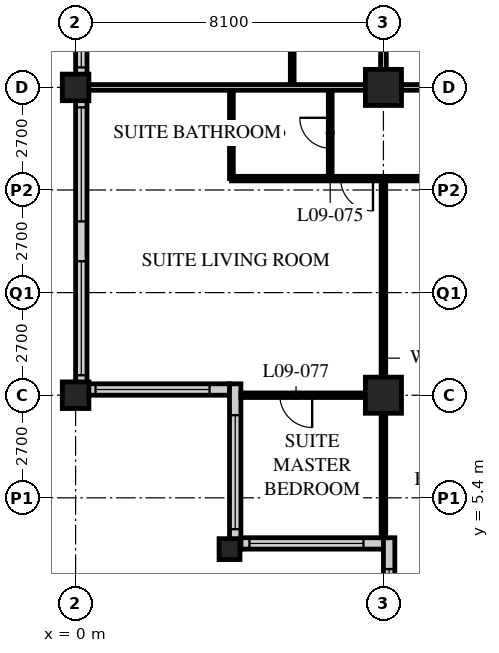
"""IFC4 building model, lengths in metres.
Left out: names, types, materials, properties, quantities, classifications, styles, units other than length and angle.
Written with IfcOpenShell. Run it as: python <this file> out.ifc"""

import sys

from ifc_helpers import new_model, si_unit, direction, frame, frame_2d, origin, origin_2d, place, context, subcontext, project, spatial, rectangle, hollow_rectangle, extrude, element, fill, save


model = new_model("IFC4")
c1 = context("Model", 3, precision=1e-05, world=origin(), true_north=direction((0.0, 1.0)))
c2 = subcontext(c1, "Body", "Model", "MODEL_VIEW")
j1 = project(units=[si_unit("LENGTHUNIT", "METRE"), si_unit("PLANEANGLEUNIT", "RADIAN")], contexts=[c1])
p1 = place(None, origin())
s1 = spatial("IfcSite", under=j1, at=p1, CompositionType="ELEMENT")
p2 = place(p1, origin())
s2 = spatial("IfcBuilding", under=s1, at=p2, CompositionType="ELEMENT")
p3 = place(p2, frame((0.0, 0.0, 43.2)))
s3 = spatial("IfcBuildingStorey", under=s2, at=p3, CompositionType="ELEMENT", Elevation=43.2)
for number, where, z_axis, x_axis in (
    (1, (0.0, 8.1, 0.0), (0.0, 0.0, 1.0), (1.0, 0.0, 0.0)),
    (2, (0.0, 16.2, 0.0), (0.0, 0.0, 1.0), (1.0, 0.0, 0.0)),
):
    element("IfcColumn", number, at=place(p3, frame(where, z_axis=z_axis, x_axis=x_axis)), inside=s3, PredefinedType="COLUMN", context=c2, shape_type="SweptSolid", body=[
        extrude(hollow_rectangle(XDim=0.7, YDim=0.7, WallThickness=0.06, at=origin_2d()), origin(), (0.0, 0.0, 1.0), 3.4),
    ])
p4 = place(p3, frame((4.05, 4.05, 0.0), z_axis=(0.0, 0.0, 1.0), x_axis=(1.0, 0.0, 0.0)))
e3 = element("IfcColumn", 3, at=p4, inside=s3, PredefinedType="COLUMN", context=c2, shape_type="SweptSolid", body=[
    extrude(hollow_rectangle(XDim=0.55, YDim=0.55, WallThickness=0.05, at=origin_2d()), origin(), (0.0, 0.0, 1.0), 3.4),
])
for number, where, z_axis, x_axis in (
    (4, (8.1, 8.1, 0.0), (0.0, 0.0, 1.0), (1.0, 0.0, 0.0)),
    (5, (8.1, 16.2, 0.0), (0.0, 0.0, 1.0), (1.0, 0.0, 0.0)),
):
    element("IfcColumn", number, at=place(p3, frame(where, z_axis=z_axis, x_axis=x_axis)), inside=s3, PredefinedType="COLUMN", context=c2, shape_type="SweptSolid", body=[
        extrude(hollow_rectangle(XDim=0.95, YDim=0.95, WallThickness=0.095, at=origin_2d()), origin(), (0.0, 0.0, 1.0), 3.4),
    ])
p5 = place(p3, frame((0.15, 40.2, 0.0), z_axis=(0.0, 0.0, 1.0), x_axis=(0.0, -1.0, 0.0)))
e6 = element("IfcWall", 6, at=p5, inside=s3, PredefinedType="SOLIDWALL", context=c2, shape_type="SweptSolid", body=[
    extrude(rectangle(XDim=32.1, YDim=0.3, at=frame_2d((16.05, 0.0))), origin(), (0.0, 0.0, 1.0), 3.19),
])
p6 = place(p5, frame((0.225, 0.0, 0.9)))
e7 = element("IfcOpeningElement", 7, at=p6, cuts=e6, PredefinedType="OPENING", context=c2, shape_type="SweptSolid", body=[
    extrude(rectangle(XDim=3.0, YDim=2.0, at=frame_2d((1.5, 1.0))), frame((0.0, 0.16, 0.0), z_axis=(0.0, -1.0, 0.0), x_axis=(1.0, 0.0, 0.0)), (0.0, 0.0, 1.0), 0.32),
])
p7 = place(p5, frame((4.275, 0.0, 0.9)))
e8 = element("IfcOpeningElement", 8, at=p7, cuts=e6, PredefinedType="OPENING", context=c2, shape_type="SweptSolid", body=[
    extrude(rectangle(XDim=3.0, YDim=2.0, at=frame_2d((1.5, 1.0))), frame((0.0, 0.16, 0.0), z_axis=(0.0, -1.0, 0.0), x_axis=(1.0, 0.0, 0.0)), (0.0, 0.0, 1.0), 0.32),
])
p8 = place(p5, frame((8.325, 0.0, 0.9)))
e9 = element("IfcOpeningElement", 9, at=p8, cuts=e6, PredefinedType="OPENING", context=c2, shape_type="SweptSolid", body=[
    extrude(rectangle(XDim=3.0, YDim=2.0, at=frame_2d((1.5, 1.0))), frame((0.0, 0.16, 0.0), z_axis=(0.0, -1.0, 0.0), x_axis=(1.0, 0.0, 0.0)), (0.0, 0.0, 1.0), 0.32),
])
p9 = place(p5, frame((12.375, 0.0, 0.9)))
e10 = element("IfcOpeningElement", 10, at=p9, cuts=e6, PredefinedType="OPENING", context=c2, shape_type="SweptSolid", body=[
    extrude(rectangle(XDim=3.0, YDim=2.0, at=frame_2d((1.5, 1.0))), frame((0.0, 0.16, 0.0), z_axis=(0.0, -1.0, 0.0), x_axis=(1.0, 0.0, 0.0)), (0.0, 0.0, 1.0), 0.32),
])
p10 = place(p5, frame((16.425, 0.0, 0.9)))
e11 = element("IfcOpeningElement", 11, at=p10, cuts=e6, PredefinedType="OPENING", context=c2, shape_type="SweptSolid", body=[
    extrude(rectangle(XDim=3.0, YDim=2.0, at=frame_2d((1.5, 1.0))), frame((0.0, 0.16, 0.0), z_axis=(0.0, -1.0, 0.0), x_axis=(1.0, 0.0, 0.0)), (0.0, 0.0, 1.0), 0.32),
])
p11 = place(p5, frame((20.475, 0.0, 0.9)))
e12 = element("IfcOpeningElement", 12, at=p11, cuts=e6, PredefinedType="OPENING", context=c2, shape_type="SweptSolid", body=[
    extrude(rectangle(XDim=3.0, YDim=2.0, at=frame_2d((1.5, 1.0))), frame((0.0, 0.16, 0.0), z_axis=(0.0, -1.0, 0.0), x_axis=(1.0, 0.0, 0.0)), (0.0, 0.0, 1.0), 0.32),
])
p12 = place(p5, frame((24.525, 0.0, 0.9)))
e13 = element("IfcOpeningElement", 13, at=p12, cuts=e6, PredefinedType="OPENING", context=c2, shape_type="SweptSolid", body=[
    extrude(rectangle(XDim=3.0, YDim=2.0, at=frame_2d((1.5, 1.0))), frame((0.0, 0.16, 0.0), z_axis=(0.0, -1.0, 0.0), x_axis=(1.0, 0.0, 0.0)), (0.0, 0.0, 1.0), 0.32),
])
p13 = place(p5, frame((28.575, 0.0, 0.9)))
e14 = element("IfcOpeningElement", 14, at=p13, cuts=e6, PredefinedType="OPENING", context=c2, shape_type="SweptSolid", body=[
    extrude(rectangle(XDim=3.0, YDim=2.0, at=frame_2d((1.5, 1.0))), frame((0.0, 0.16, 0.0), z_axis=(0.0, -1.0, 0.0), x_axis=(1.0, 0.0, 0.0)), (0.0, 0.0, 1.0), 0.32),
])
p14 = place(p3, frame((0.3, 8.25, 0.0), z_axis=(0.0, 0.0, 1.0), x_axis=(1.0, 0.0, 0.0)))
e15 = element("IfcWall", 15, at=p14, inside=s3, PredefinedType="SOLIDWALL", context=c2, shape_type="SweptSolid", body=[
    extrude(rectangle(XDim=3.75, YDim=0.3, at=frame_2d((1.875, 0.0))), origin(), (0.0, 0.0, 1.0), 3.19),
])
p15 = place(p14, frame((0.225, 0.0, 0.9)))
e16 = element("IfcOpeningElement", 16, at=p15, cuts=e15, PredefinedType="OPENING", context=c2, shape_type="SweptSolid", body=[
    extrude(rectangle(XDim=3.0, YDim=1.5, at=frame_2d((1.5, 0.75))), frame((0.0, 0.16, 0.0), z_axis=(0.0, -1.0, 0.0), x_axis=(1.0, 0.0, 0.0)), (0.0, 0.0, 1.0), 0.32),
])
p16 = place(p3, frame((4.2, 8.4, 0.0), z_axis=(0.0, 0.0, 1.0), x_axis=(0.0, -1.0, 0.0)))
e17 = element("IfcWall", 17, at=p16, inside=s3, PredefinedType="SOLIDWALL", context=c2, shape_type="SweptSolid", body=[
    extrude(rectangle(XDim=4.35, YDim=0.3, at=frame_2d((2.175, 0.0))), origin(), (0.0, 0.0, 1.0), 3.19),
])
p17 = place(p16, frame((0.825, 0.0, 0.9)))
e18 = element("IfcOpeningElement", 18, at=p17, cuts=e17, PredefinedType="OPENING", context=c2, shape_type="SweptSolid", body=[
    extrude(rectangle(XDim=3.0, YDim=1.5, at=frame_2d((1.5, 0.75))), frame((0.0, 0.16, 0.0), z_axis=(0.0, -1.0, 0.0), x_axis=(1.0, 0.0, 0.0)), (0.0, 0.0, 1.0), 0.32),
])
p18 = place(p3, frame((4.35, 4.2, 0.0), z_axis=(0.0, 0.0, 1.0), x_axis=(1.0, 0.0, 0.0)))
e19 = element("IfcWall", 19, at=p18, inside=s3, PredefinedType="SOLIDWALL", context=c2, shape_type="SweptSolid", body=[
    extrude(rectangle(XDim=3.75, YDim=0.3, at=frame_2d((1.875, 0.0))), origin(), (0.0, 0.0, 1.0), 3.19),
])
p19 = place(p18, frame((0.225, 0.0, 0.9)))
e20 = element("IfcOpeningElement", 20, at=p19, cuts=e19, PredefinedType="OPENING", context=c2, shape_type="SweptSolid", body=[
    extrude(rectangle(XDim=3.0, YDim=1.5, at=frame_2d((1.5, 0.75))), frame((0.0, 0.16, 0.0), z_axis=(0.0, -1.0, 0.0), x_axis=(1.0, 0.0, 0.0)), (0.0, 0.0, 1.0), 0.32),
])
p20 = place(p3, frame((8.25, 4.35, 0.0), z_axis=(0.0, 0.0, 1.0), x_axis=(0.0, -1.0, 0.0)))
e21 = element("IfcWall", 21, at=p20, inside=s3, PredefinedType="SOLIDWALL", context=c2, shape_type="SweptSolid", body=[
    extrude(rectangle(XDim=4.35, YDim=0.3, at=frame_2d((2.175, 0.0))), origin(), (0.0, 0.0, 1.0), 3.19),
])
p21 = place(p20, frame((0.825, 0.0, 0.9)))
e22 = element("IfcOpeningElement", 22, at=p21, cuts=e21, PredefinedType="OPENING", context=c2, shape_type="SweptSolid", body=[
    extrude(rectangle(XDim=3.0, YDim=1.5, at=frame_2d((1.5, 0.75))), frame((0.0, 0.16, 0.0), z_axis=(0.0, -1.0, 0.0), x_axis=(1.0, 0.0, 0.0)), (0.0, 0.0, 1.0), 0.32),
])
p22 = place(p3, frame((8.1, 16.2, 0.0), z_axis=(0.0, 0.0, 1.0), x_axis=(1.0, 0.0, 0.0)))
e23 = element("IfcWall", 23, at=p22, inside=s3, PredefinedType="PARTITIONING", context=c2, shape_type="SweptSolid", body=[
    extrude(rectangle(XDim=40.5, YDim=0.15, at=frame_2d((20.25, 0.0))), origin(), (0.0, 0.0, 1.0), 2.578),
])
p23 = place(p22, frame((4.35, 0.0, 0.0)))
e24 = element("IfcOpeningElement", 24, at=p23, cuts=e23, PredefinedType="OPENING", context=c2, shape_type="SweptSolid", body=[
    extrude(rectangle(XDim=1.0, YDim=2.1, at=frame_2d((0.5, 1.05))), frame((0.0, 0.085, 0.0), z_axis=(0.0, -1.0, 0.0), x_axis=(1.0, 0.0, 0.0)), (0.0, 0.0, 1.0), 0.17),
])
p24 = place(p22, frame((10.85, 0.0, 0.0)))
e25 = element("IfcOpeningElement", 25, at=p24, cuts=e23, PredefinedType="OPENING", context=c2, shape_type="SweptSolid", body=[
    extrude(rectangle(XDim=1.0, YDim=2.1, at=frame_2d((0.5, 1.05))), frame((0.0, 0.085, 0.0), z_axis=(0.0, -1.0, 0.0), x_axis=(1.0, 0.0, 0.0)), (0.0, 0.0, 1.0), 0.17),
])
p25 = place(p22, frame((12.75, 0.0, 0.0)))
e26 = element("IfcOpeningElement", 26, at=p25, cuts=e23, PredefinedType="OPENING", context=c2, shape_type="SweptSolid", body=[
    extrude(rectangle(XDim=1.0, YDim=2.1, at=frame_2d((0.5, 1.05))), frame((0.0, 0.085, 0.0), z_axis=(0.0, -1.0, 0.0), x_axis=(1.0, 0.0, 0.0)), (0.0, 0.0, 1.0), 0.17),
])
p26 = place(p22, frame((18.95, 0.0, 0.0)))
e27 = element("IfcOpeningElement", 27, at=p26, cuts=e23, PredefinedType="OPENING", context=c2, shape_type="SweptSolid", body=[
    extrude(rectangle(XDim=1.0, YDim=2.1, at=frame_2d((0.5, 1.05))), frame((0.0, 0.085, 0.0), z_axis=(0.0, -1.0, 0.0), x_axis=(1.0, 0.0, 0.0)), (0.0, 0.0, 1.0), 0.17),
])
p27 = place(p22, frame((20.55, 0.0, 0.0)))
e28 = element("IfcOpeningElement", 28, at=p27, cuts=e23, PredefinedType="OPENING", context=c2, shape_type="SweptSolid", body=[
    extrude(rectangle(XDim=1.0, YDim=2.1, at=frame_2d((0.5, 1.05))), frame((0.0, 0.085, 0.0), z_axis=(0.0, -1.0, 0.0), x_axis=(1.0, 0.0, 0.0)), (0.0, 0.0, 1.0), 0.17),
])
p28 = place(p22, frame((27.05, 0.0, 0.0)))
e29 = element("IfcOpeningElement", 29, at=p28, cuts=e23, PredefinedType="OPENING", context=c2, shape_type="SweptSolid", body=[
    extrude(rectangle(XDim=1.0, YDim=2.1, at=frame_2d((0.5, 1.05))), frame((0.0, 0.085, 0.0), z_axis=(0.0, -1.0, 0.0), x_axis=(1.0, 0.0, 0.0)), (0.0, 0.0, 1.0), 0.17),
])
p29 = place(p22, frame((28.95, 0.0, 0.0)))
e30 = element("IfcOpeningElement", 30, at=p29, cuts=e23, PredefinedType="OPENING", context=c2, shape_type="SweptSolid", body=[
    extrude(rectangle(XDim=1.0, YDim=2.1, at=frame_2d((0.5, 1.05))), frame((0.0, 0.085, 0.0), z_axis=(0.0, -1.0, 0.0), x_axis=(1.0, 0.0, 0.0)), (0.0, 0.0, 1.0), 0.17),
])
p30 = place(p22, frame((34.85, 0.0, 0.0)))
e31 = element("IfcOpeningElement", 31, at=p30, cuts=e23, PredefinedType="OPENING", context=c2, shape_type="SweptSolid", body=[
    extrude(rectangle(XDim=1.0, YDim=2.1, at=frame_2d((0.5, 1.05))), frame((0.0, 0.085, 0.0), z_axis=(0.0, -1.0, 0.0), x_axis=(1.0, 0.0, 0.0)), (0.0, 0.0, 1.0), 0.17),
])
p31 = place(p22, frame((1.525, 0.0, 0.0)))
e32 = element("IfcOpeningElement", 32, at=p31, cuts=e23, PredefinedType="OPENING", context=c2, shape_type="SweptSolid", body=[
    extrude(rectangle(XDim=1.0, YDim=2.1, at=frame_2d((0.5, 1.05))), frame((0.0, 0.085, 0.0), z_axis=(0.0, -1.0, 0.0), x_axis=(1.0, 0.0, 0.0)), (0.0, 0.0, 1.0), 0.17),
])
p32 = place(p22, frame((37.975, 0.0, 0.0)))
e33 = element("IfcOpeningElement", 33, at=p32, cuts=e23, PredefinedType="OPENING", context=c2, shape_type="SweptSolid", body=[
    extrude(rectangle(XDim=1.0, YDim=2.1, at=frame_2d((0.5, 1.05))), frame((0.0, 0.085, 0.0), z_axis=(0.0, -1.0, 0.0), x_axis=(1.0, 0.0, 0.0)), (0.0, 0.0, 1.0), 0.17),
])
p33 = place(p3, frame((8.1, 16.2, 0.0), z_axis=(0.0, 0.0, 1.0), x_axis=(0.0, 1.0, 0.0)))
e34 = element("IfcWall", 34, at=p33, inside=s3, PredefinedType="PARTITIONING", context=c2, shape_type="SweptSolid", body=[
    extrude(rectangle(XDim=26.1, YDim=0.15, at=frame_2d((13.05, 0.0))), origin(), (0.0, 0.0, 1.0), 2.578),
])
p34 = place(p33, frame((2.75, 0.0, 0.0)))
e35 = element("IfcOpeningElement", 35, at=p34, cuts=e34, PredefinedType="OPENING", context=c2, shape_type="SweptSolid", body=[
    extrude(rectangle(XDim=1.0, YDim=2.1, at=frame_2d((0.5, 1.05))), frame((0.0, 0.085, 0.0), z_axis=(0.0, -1.0, 0.0), x_axis=(1.0, 0.0, 0.0)), (0.0, 0.0, 1.0), 0.17),
])
p35 = place(p33, frame((4.35, 0.0, 0.0)))
e36 = element("IfcOpeningElement", 36, at=p35, cuts=e34, PredefinedType="OPENING", context=c2, shape_type="SweptSolid", body=[
    extrude(rectangle(XDim=1.0, YDim=2.1, at=frame_2d((0.5, 1.05))), frame((0.0, 0.085, 0.0), z_axis=(0.0, -1.0, 0.0), x_axis=(1.0, 0.0, 0.0)), (0.0, 0.0, 1.0), 0.17),
])
p36 = place(p33, frame((10.85, 0.0, 0.0)))
e37 = element("IfcOpeningElement", 37, at=p36, cuts=e34, PredefinedType="OPENING", context=c2, shape_type="SweptSolid", body=[
    extrude(rectangle(XDim=1.0, YDim=2.1, at=frame_2d((0.5, 1.05))), frame((0.0, 0.085, 0.0), z_axis=(0.0, -1.0, 0.0), x_axis=(1.0, 0.0, 0.0)), (0.0, 0.0, 1.0), 0.17),
])
p37 = place(p33, frame((12.45, 0.0, 0.0)))
e38 = element("IfcOpeningElement", 38, at=p37, cuts=e34, PredefinedType="OPENING", context=c2, shape_type="SweptSolid", body=[
    extrude(rectangle(XDim=1.0, YDim=2.1, at=frame_2d((0.5, 1.05))), frame((0.0, 0.085, 0.0), z_axis=(0.0, -1.0, 0.0), x_axis=(1.0, 0.0, 0.0)), (0.0, 0.0, 1.0), 0.17),
])
p38 = place(p33, frame((18.65, 0.0, 0.0)))
e39 = element("IfcOpeningElement", 39, at=p38, cuts=e34, PredefinedType="OPENING", context=c2, shape_type="SweptSolid", body=[
    extrude(rectangle(XDim=1.0, YDim=2.1, at=frame_2d((0.5, 1.05))), frame((0.0, 0.085, 0.0), z_axis=(0.0, -1.0, 0.0), x_axis=(1.0, 0.0, 0.0)), (0.0, 0.0, 1.0), 0.17),
])
p39 = place(p33, frame((22.7, 0.0, 0.0)))
e40 = element("IfcOpeningElement", 40, at=p39, cuts=e34, PredefinedType="OPENING", context=c2, shape_type="SweptSolid", body=[
    extrude(rectangle(XDim=1.0, YDim=2.1, at=frame_2d((0.5, 1.05))), frame((0.0, 0.085, 0.0), z_axis=(0.0, -1.0, 0.0), x_axis=(1.0, 0.0, 0.0)), (0.0, 0.0, 1.0), 0.17),
])
p40 = place(p3, frame((5.7, 16.2, 0.0), z_axis=(0.0, 0.0, 1.0), x_axis=(0.0, 1.0, 0.0)))
e41 = element("IfcWall", 41, at=p40, inside=s3, PredefinedType="PARTITIONING", context=c2, shape_type="SweptSolid", body=[
    extrude(rectangle(XDim=2.6, YDim=0.1, at=frame_2d((1.3, 0.0))), origin(), (0.0, 0.0, 1.0), 3.19),
])
p41 = place(p3, frame((6.7, 16.2, 0.0), z_axis=(0.0, 0.0, 1.0), x_axis=(0.0, -1.0, 0.0)))
e42 = element("IfcWall", 42, at=p41, inside=s3, PredefinedType="PARTITIONING", context=c2, shape_type="SweptSolid", body=[
    extrude(rectangle(XDim=2.4, YDim=0.1, at=frame_2d((1.2, 0.0))), origin(), (0.0, 0.0, 1.0), 3.19),
])
p42 = place(p41, frame((0.8, 0.0, 0.0)))
e43 = element("IfcOpeningElement", 43, at=p42, cuts=e42, PredefinedType="OPENING", context=c2, shape_type="SweptSolid", body=[
    extrude(rectangle(XDim=0.8, YDim=2.1, at=frame_2d((0.4, 1.05))), frame((0.0, 0.06, 0.0), z_axis=(0.0, -1.0, 0.0), x_axis=(1.0, 0.0, 0.0)), (0.0, 0.0, 1.0), 0.12),
])
p43 = place(p3, frame((4.1, 16.2, 0.0), z_axis=(0.0, 0.0, 1.0), x_axis=(0.0, -1.0, 0.0)))
e44 = element("IfcWall", 44, at=p43, inside=s3, PredefinedType="PARTITIONING", context=c2, shape_type="SweptSolid", body=[
    extrude(rectangle(XDim=2.4, YDim=0.1, at=frame_2d((1.2, 0.0))), origin(), (0.0, 0.0, 1.0), 3.19),
])
p44 = place(p3, frame((4.1, 13.8, 0.0), z_axis=(0.0, 0.0, 1.0), x_axis=(1.0, 0.0, 0.0)))
e45 = element("IfcWall", 45, at=p44, inside=s3, PredefinedType="PARTITIONING", context=c2, shape_type="SweptSolid", body=[
    extrude(rectangle(XDim=8.05, YDim=0.12, at=frame_2d((4.025, 0.0))), origin(), (0.0, 0.0, 1.0), 3.19),
])
p45 = place(p44, frame((6.725, 0.0, 0.0)))
e46 = element("IfcOpeningElement", 46, at=p45, cuts=e45, PredefinedType="OPENING", context=c2, shape_type="SweptSolid", body=[
    extrude(rectangle(XDim=0.85, YDim=2.1, at=frame_2d((0.425, 1.05))), frame((0.0, 0.07, 0.0), z_axis=(0.0, -1.0, 0.0), x_axis=(1.0, 0.0, 0.0)), (0.0, 0.0, 1.0), 0.14),
])
p46 = place(p44, frame((2.875, 0.0, 0.0)))
e47 = element("IfcOpeningElement", 47, at=p46, cuts=e45, PredefinedType="OPENING", context=c2, shape_type="SweptSolid", body=[
    extrude(rectangle(XDim=0.85, YDim=2.1, at=frame_2d((0.425, 1.05))), frame((0.0, 0.07, 0.0), z_axis=(0.0, -1.0, 0.0), x_axis=(1.0, 0.0, 0.0)), (0.0, 0.0, 1.0), 0.14),
])
p47 = place(p3, frame((8.1, 13.8, 0.0), z_axis=(0.0, 0.0, 1.0), x_axis=(0.0, -1.0, 0.0)))
e48 = element("IfcWall", 48, at=p47, inside=s3, PredefinedType="PARTITIONING", context=c2, shape_type="SweptSolid", body=[
    extrude(rectangle(XDim=9.45, YDim=0.12, at=frame_2d((4.725, 0.0))), origin(), (0.0, 0.0, 1.0), 2.578),
])
p48 = place(p3, frame((8.1, 8.1, 0.0), z_axis=(0.0, 0.0, 1.0), x_axis=(-1.0, 0.0, 0.0)))
e49 = element("IfcWall", 49, at=p48, inside=s3, PredefinedType="PARTITIONING", context=c2, shape_type="SweptSolid", body=[
    extrude(rectangle(XDim=3.75, YDim=0.12, at=frame_2d((1.875, 0.0))), origin(), (0.0, 0.0, 1.0), 2.578),
])
p49 = place(p48, frame((1.875, 0.0, 0.0)))
e50 = element("IfcOpeningElement", 50, at=p49, cuts=e49, PredefinedType="OPENING", context=c2, shape_type="SweptSolid", body=[
    extrude(rectangle(XDim=0.85, YDim=2.1, at=frame_2d((0.425, 1.05))), frame((0.0, 0.07, 0.0), z_axis=(0.0, -1.0, 0.0), x_axis=(1.0, 0.0, 0.0)), (0.0, 0.0, 1.0), 0.14),
])
p50 = place(p3, frame((0.3, 16.2, 0.0), z_axis=(0.0, 0.0, 1.0), x_axis=(1.0, 0.0, 0.0)))
e51 = element("IfcWall", 51, at=p50, inside=s3, PredefinedType="PARTITIONING", context=c2, shape_type="SweptSolid", body=[
    extrude(rectangle(XDim=7.8, YDim=0.15, at=frame_2d((3.9, 0.0))), origin(), (0.0, 0.0, 1.0), 2.578),
])
p51 = place(p11, origin())
e52 = element("IfcWindow", 52, at=p51, inside=s3, PartitioningType="SINGLE_PANEL", PredefinedType="WINDOW", context=c2, shape_type="SweptSolid", body=[
    extrude(rectangle(XDim=3.0, YDim=2.0, at=frame_2d((1.5, 1.0))), frame((0.0, 0.03, 0.0), z_axis=(0.0, -1.0, 0.0), x_axis=(1.0, 0.0, 0.0)), (0.0, 0.0, 1.0), 0.06),
])
fill(e12, e52)
p52 = place(p12, origin())
e53 = element("IfcWindow", 53, at=p52, inside=s3, PartitioningType="SINGLE_PANEL", PredefinedType="WINDOW", context=c2, shape_type="SweptSolid", body=[
    extrude(rectangle(XDim=3.0, YDim=2.0, at=frame_2d((1.5, 1.0))), frame((0.0, 0.03, 0.0), z_axis=(0.0, -1.0, 0.0), x_axis=(1.0, 0.0, 0.0)), (0.0, 0.0, 1.0), 0.06),
])
fill(e13, e53)
p53 = place(p13, origin())
e54 = element("IfcWindow", 54, at=p53, inside=s3, PartitioningType="SINGLE_PANEL", PredefinedType="WINDOW", context=c2, shape_type="SweptSolid", body=[
    extrude(rectangle(XDim=3.0, YDim=2.0, at=frame_2d((1.5, 1.0))), frame((0.0, 0.03, 0.0), z_axis=(0.0, -1.0, 0.0), x_axis=(1.0, 0.0, 0.0)), (0.0, 0.0, 1.0), 0.06),
])
fill(e14, e54)
p54 = place(p15, origin())
e55 = element("IfcWindow", 55, at=p54, inside=s3, PartitioningType="SINGLE_PANEL", PredefinedType="WINDOW", context=c2, shape_type="SweptSolid", body=[
    extrude(rectangle(XDim=3.0, YDim=1.5, at=frame_2d((1.5, 0.75))), frame((0.0, 0.03, 0.0), z_axis=(0.0, -1.0, 0.0), x_axis=(1.0, 0.0, 0.0)), (0.0, 0.0, 1.0), 0.06),
])
fill(e16, e55)
p55 = place(p17, origin())
e56 = element("IfcWindow", 56, at=p55, inside=s3, PartitioningType="SINGLE_PANEL", PredefinedType="WINDOW", context=c2, shape_type="SweptSolid", body=[
    extrude(rectangle(XDim=3.0, YDim=1.5, at=frame_2d((1.5, 0.75))), frame((0.0, 0.03, 0.0), z_axis=(0.0, -1.0, 0.0), x_axis=(1.0, 0.0, 0.0)), (0.0, 0.0, 1.0), 0.06),
])
fill(e18, e56)
p56 = place(p19, origin())
e57 = element("IfcWindow", 57, at=p56, inside=s3, PartitioningType="SINGLE_PANEL", PredefinedType="WINDOW", context=c2, shape_type="SweptSolid", body=[
    extrude(rectangle(XDim=3.0, YDim=1.5, at=frame_2d((1.5, 0.75))), frame((0.0, 0.03, 0.0), z_axis=(0.0, -1.0, 0.0), x_axis=(1.0, 0.0, 0.0)), (0.0, 0.0, 1.0), 0.06),
])
fill(e20, e57)
p57 = place(p21, origin())
e58 = element("IfcWindow", 58, at=p57, inside=s3, PartitioningType="SINGLE_PANEL", PredefinedType="WINDOW", context=c2, shape_type="SweptSolid", body=[
    extrude(rectangle(XDim=3.0, YDim=1.5, at=frame_2d((1.5, 0.75))), frame((0.0, 0.03, 0.0), z_axis=(0.0, -1.0, 0.0), x_axis=(1.0, 0.0, 0.0)), (0.0, 0.0, 1.0), 0.06),
])
fill(e22, e58)
p58 = place(p42, origin())
e59 = element("IfcDoor", 59, at=p58, inside=s3, OperationType="SINGLE_SWING_RIGHT", PredefinedType="DOOR", context=c2, shape_type="SweptSolid", body=[
    extrude(rectangle(XDim=0.8, YDim=2.1, at=frame_2d((0.4, 1.05))), frame((0.0, 0.025, 0.0), z_axis=(0.0, -1.0, 0.0), x_axis=(1.0, 0.0, 0.0)), (0.0, 0.0, 1.0), 0.05),
])
fill(e43, e59)
p59 = place(p46, origin())
e60 = element("IfcDoor", 60, at=p59, inside=s3, OperationType="SINGLE_SWING_LEFT", PredefinedType="DOOR", context=c2, shape_type="SweptSolid", body=[
    extrude(rectangle(XDim=0.85, YDim=2.1, at=frame_2d((0.425, 1.05))), frame((0.0, 0.025, 0.0), z_axis=(0.0, -1.0, 0.0), x_axis=(1.0, 0.0, 0.0)), (0.0, 0.0, 1.0), 0.05),
])
fill(e47, e60)
p60 = place(p49, origin())
e61 = element("IfcDoor", 61, at=p60, inside=s3, OperationType="SINGLE_SWING_LEFT", PredefinedType="DOOR", context=c2, shape_type="SweptSolid", body=[
    extrude(rectangle(XDim=0.85, YDim=2.1, at=frame_2d((0.425, 1.05))), frame((0.0, 0.025, 0.0), z_axis=(0.0, -1.0, 0.0), x_axis=(1.0, 0.0, 0.0)), (0.0, 0.0, 1.0), 0.05),
])
fill(e50, e61)
save(model, sys.argv[1])
